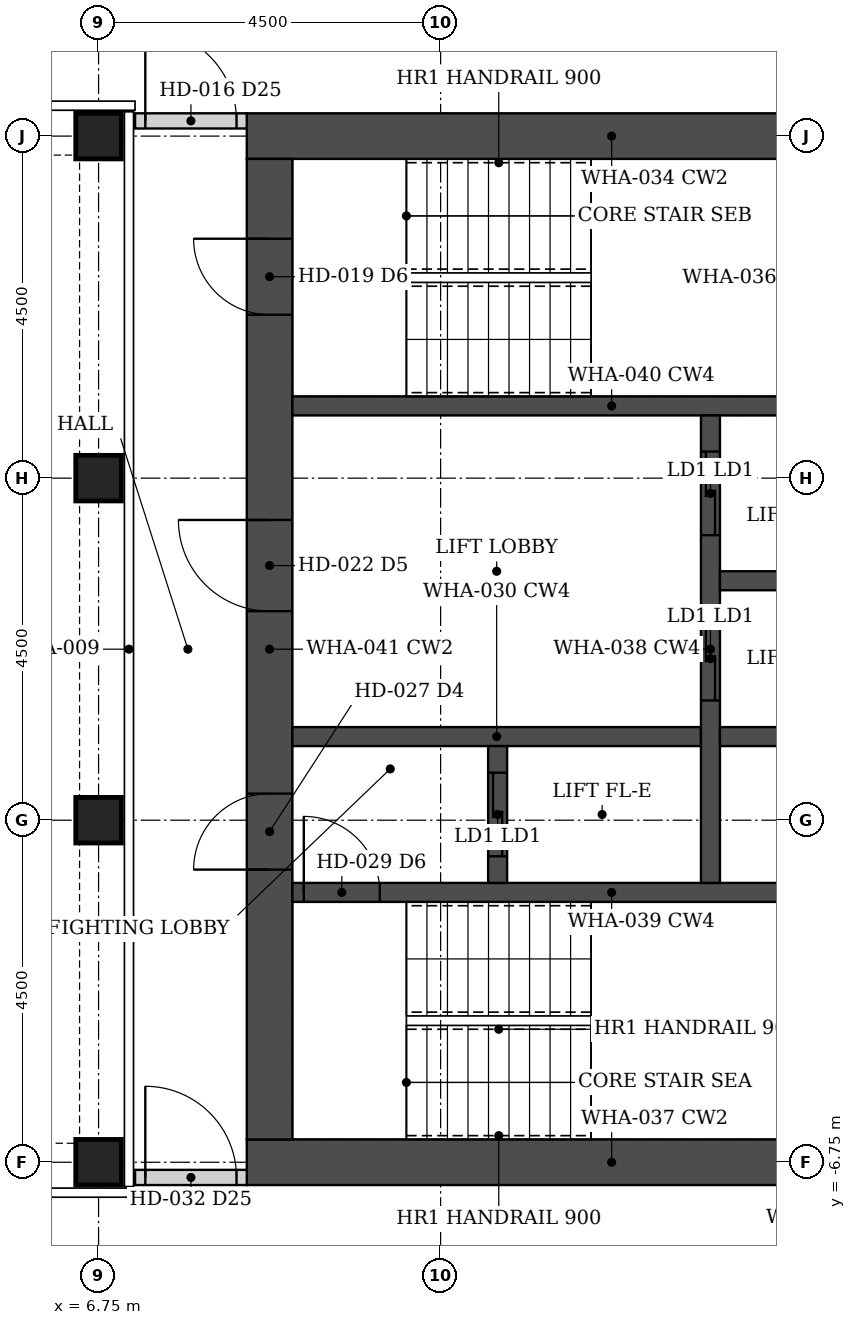
"""IFC4 building model, lengths in metres.
Left out: names, types, materials, properties, quantities, classifications, styles, units other than length and angle.
Written with IfcOpenShell. Run it as: python <this file> out.ifc"""

import sys

from ifc_helpers import new_model, si_unit, direction, frame, frame_2d, origin, origin_2d, place, context, subcontext, project, spatial, rectangle, hollow_rectangle, extrude, element, fill, save


model = new_model("IFC4")
c1 = context("Model", 3, precision=1e-05, world=origin(), true_north=direction((0.0, 1.0)))
c2 = subcontext(c1, "Body", "Model", "MODEL_VIEW")
j1 = project(units=[si_unit("LENGTHUNIT", "METRE"), si_unit("PLANEANGLEUNIT", "RADIAN")], contexts=[c1])
p1 = place(None, origin())
s1 = spatial("IfcSite", under=j1, at=p1, CompositionType="ELEMENT")
p2 = place(p1, origin())
s2 = spatial("IfcBuilding", under=s1, at=p2, CompositionType="ELEMENT")
p3 = place(p2, frame((0.0, 0.0, 150.8)))
s3 = spatial("IfcBuildingStorey", under=s2, at=p3, CompositionType="ELEMENT", Elevation=150.8)
for number, where, z_axis, x_axis in (
    (1, (6.75, -6.75, 0.0), (0.0, 0.0, 1.0), (1.0, 0.0, 0.0)),
    (2, (6.75, -2.25, 0.0), (0.0, 0.0, 1.0), (1.0, 0.0, 0.0)),
    (3, (6.75, 2.25, 0.0), (0.0, 0.0, 1.0), (1.0, 0.0, 0.0)),
    (4, (6.75, 6.75, 0.0), (0.0, 0.0, 1.0), (1.0, 0.0, 0.0)),
):
    element("IfcColumn", number, at=place(p3, frame(where, z_axis=z_axis, x_axis=x_axis)), inside=s3, PredefinedType="COLUMN", context=c2, shape_type="SweptSolid", body=[
        extrude(hollow_rectangle(XDim=0.6, YDim=0.6, WallThickness=0.04, at=origin_2d()), origin(), (0.0, 0.0, 1.0), 3.6),
    ])
for number, where, z_axis, x_axis in (
    (5, (8.7, -6.75, 0.0), (0.0, 0.0, 1.0), (1.0, 0.0, 0.0)),
    (6, (8.7, 6.75, 0.0), (0.0, 0.0, 1.0), (1.0, 0.0, 0.0)),
):
    element("IfcWall", number, at=place(p3, frame(where, z_axis=z_axis, x_axis=x_axis)), inside=s3, PredefinedType="SHEAR", context=c2, shape_type="SweptSolid", body=[
        extrude(rectangle(XDim=9.6, YDim=0.6, at=frame_2d((4.8, 0.0))), origin(), (0.0, 0.0, 1.0), 3.6),
    ])
p4 = place(p3, frame((9.0, -6.45, 0.0), z_axis=(0.0, 0.0, 1.0), x_axis=(0.0, 1.0, 0.0)))
e7 = element("IfcWall", 7, at=p4, inside=s3, PredefinedType="SHEAR", context=c2, shape_type="SweptSolid", body=[
    extrude(rectangle(XDim=12.9, YDim=0.6, at=frame_2d((6.45, 0.0))), origin(), (0.0, 0.0, 1.0), 3.6),
])
p5 = place(p4, frame((3.55, 0.0, 0.0)))
e8 = element("IfcOpeningElement", 8, at=p5, cuts=e7, PredefinedType="OPENING", context=c2, shape_type="SweptSolid", body=[
    extrude(rectangle(XDim=1.0, YDim=2.1, at=frame_2d((0.5, 1.05))), frame((0.0, 0.31, 0.0), z_axis=(0.0, -1.0, 0.0), x_axis=(1.0, 0.0, 0.0)), (0.0, 0.0, 1.0), 0.62),
])
p6 = place(p4, frame((6.95, 0.0, 0.0)))
e9 = element("IfcOpeningElement", 9, at=p6, cuts=e7, PredefinedType="OPENING", context=c2, shape_type="SweptSolid", body=[
    extrude(rectangle(XDim=1.2, YDim=2.1, at=frame_2d((0.6, 1.05))), frame((0.0, 0.31, 0.0), z_axis=(0.0, -1.0, 0.0), x_axis=(1.0, 0.0, 0.0)), (0.0, 0.0, 1.0), 0.62),
])
p7 = place(p4, frame((10.85, 0.0, 0.0)))
e10 = element("IfcOpeningElement", 10, at=p7, cuts=e7, PredefinedType="OPENING", context=c2, shape_type="SweptSolid", body=[
    extrude(rectangle(XDim=1.0, YDim=2.1, at=frame_2d((0.5, 1.05))), frame((0.0, 0.31, 0.0), z_axis=(0.0, -1.0, 0.0), x_axis=(1.0, 0.0, 0.0)), (0.0, 0.0, 1.0), 0.62),
])
p8 = place(p3, frame((9.3, -3.2, 0.0), z_axis=(0.0, 0.0, 1.0), x_axis=(1.0, 0.0, 0.0)))
e11 = element("IfcWall", 11, at=p8, inside=s3, PredefinedType="SHEAR", context=c2, shape_type="SweptSolid", body=[
    extrude(rectangle(XDim=8.4, YDim=0.25, at=frame_2d((4.2, 0.0))), origin(), (0.0, 0.0, 1.0), 3.6),
])
p9 = place(p8, frame((0.15, 0.0, 0.0)))
e12 = element("IfcOpeningElement", 12, at=p9, cuts=e11, PredefinedType="OPENING", context=c2, shape_type="SweptSolid", body=[
    extrude(rectangle(XDim=1.0, YDim=2.1, at=frame_2d((0.5, 1.05))), frame((0.0, 0.135, 0.0), z_axis=(0.0, -1.0, 0.0), x_axis=(1.0, 0.0, 0.0)), (0.0, 0.0, 1.0), 0.27),
])
p10 = place(p3, frame((9.3, 3.2, 0.0), z_axis=(0.0, 0.0, 1.0), x_axis=(1.0, 0.0, 0.0)))
e13 = element("IfcWall", 13, at=p10, inside=s3, PredefinedType="SHEAR", context=c2, shape_type="SweptSolid", body=[
    extrude(rectangle(XDim=8.4, YDim=0.25, at=frame_2d((4.2, 0.0))), origin(), (0.0, 0.0, 1.0), 3.6),
])
p11 = place(p3, frame((9.3, -1.15, 0.0), z_axis=(0.0, 0.0, 1.0), x_axis=(1.0, 0.0, 0.0)))
e14 = element("IfcWall", 14, at=p11, inside=s3, PredefinedType="SHEAR", context=c2, shape_type="SweptSolid", body=[
    extrude(rectangle(XDim=5.375, YDim=0.25, at=frame_2d((2.688, 0.0))), origin(), (0.0, 0.0, 1.0), 3.6),
])
p12 = place(p3, frame((12.0, -3.075, 0.0), z_axis=(0.0, 0.0, 1.0), x_axis=(0.0, 1.0, 0.0)))
e15 = element("IfcWall", 15, at=p12, inside=s3, PredefinedType="SHEAR", context=c2, shape_type="SweptSolid", body=[
    extrude(rectangle(XDim=1.8, YDim=0.25, at=frame_2d((0.9, 0.0))), origin(), (0.0, 0.0, 1.0), 3.6),
])
p13 = place(p12, frame((0.35, 0.0, 0.0)))
e16 = element("IfcOpeningElement", 16, at=p13, cuts=e15, PredefinedType="OPENING", context=c2, shape_type="SweptSolid", body=[
    extrude(rectangle(XDim=1.1, YDim=2.1, at=frame_2d((0.55, 1.05))), frame((0.0, 0.135, 0.0), z_axis=(0.0, -1.0, 0.0), x_axis=(1.0, 0.0, 0.0)), (0.0, 0.0, 1.0), 0.27),
])
p14 = place(p3, frame((14.8, -3.075, 0.0), z_axis=(0.0, 0.0, 1.0), x_axis=(0.0, 1.0, 0.0)))
e17 = element("IfcWall", 17, at=p14, inside=s3, PredefinedType="SHEAR", context=c2, shape_type="SweptSolid", body=[
    extrude(rectangle(XDim=6.15, YDim=0.25, at=frame_2d((3.075, 0.0))), origin(), (0.0, 0.0, 1.0), 3.6),
])
p15 = place(p14, frame((2.4, 0.0, 0.0)))
e18 = element("IfcOpeningElement", 18, at=p15, cuts=e17, PredefinedType="OPENING", context=c2, shape_type="SweptSolid", body=[
    extrude(rectangle(XDim=1.1, YDim=2.1, at=frame_2d((0.55, 1.05))), frame((0.0, 0.135, 0.0), z_axis=(0.0, -1.0, 0.0), x_axis=(1.0, 0.0, 0.0)), (0.0, 0.0, 1.0), 0.27),
])
p16 = place(p14, frame((4.575, 0.0, 0.0)))
e19 = element("IfcOpeningElement", 19, at=p16, cuts=e17, PredefinedType="OPENING", context=c2, shape_type="SweptSolid", body=[
    extrude(rectangle(XDim=1.1, YDim=2.1, at=frame_2d((0.55, 1.05))), frame((0.0, 0.135, 0.0), z_axis=(0.0, -1.0, 0.0), x_axis=(1.0, 0.0, 0.0)), (0.0, 0.0, 1.0), 0.27),
])
for number, where, z_axis, x_axis in (
    (20, (14.925, -1.15, 0.0), (0.0, 0.0, 1.0), (1.0, 0.0, 0.0)),
    (21, (14.925, 0.9, 0.0), (0.0, 0.0, 1.0), (1.0, 0.0, 0.0)),
):
    element("IfcWall", number, at=place(p3, frame(where, z_axis=z_axis, x_axis=x_axis)), inside=s3, PredefinedType="SHEAR", context=c2, shape_type="SweptSolid", body=[
        extrude(rectangle(XDim=2.775, YDim=0.25, at=frame_2d((1.387, 0.0))), origin(), (0.0, 0.0, 1.0), 3.6),
    ])
p17 = place(p3, frame((7.23, 6.95, 0.0), z_axis=(0.0, 0.0, 1.0), x_axis=(1.0, 0.0, 0.0)))
e22 = element("IfcWall", 22, at=p17, inside=s3, PredefinedType="PARTITIONING", context=c2, shape_type="SweptSolid", body=[
    extrude(rectangle(XDim=1.47, YDim=0.2, at=frame_2d((0.735, 0.0))), origin(), (0.0, 0.0, 1.0), 2.473),
])
p18 = place(p17, frame((0.135, 0.0, 0.0)))
e23 = element("IfcOpeningElement", 23, at=p18, cuts=e22, PredefinedType="OPENING", context=c2, shape_type="SweptSolid", body=[
    extrude(rectangle(XDim=1.2, YDim=2.1, at=frame_2d((0.6, 1.05))), frame((0.0, 0.11, 0.0), z_axis=(0.0, -1.0, 0.0), x_axis=(1.0, 0.0, 0.0)), (0.0, 0.0, 1.0), 0.22),
])
p19 = place(p3, frame((7.23, -6.95, 0.0), z_axis=(0.0, 0.0, 1.0), x_axis=(1.0, 0.0, 0.0)))
e24 = element("IfcWall", 24, at=p19, inside=s3, PredefinedType="PARTITIONING", context=c2, shape_type="SweptSolid", body=[
    extrude(rectangle(XDim=1.47, YDim=0.2, at=frame_2d((0.735, 0.0))), origin(), (0.0, 0.0, 1.0), 2.473),
])
p20 = place(p19, frame((0.135, 0.0, 0.0)))
e25 = element("IfcOpeningElement", 25, at=p20, cuts=e24, PredefinedType="OPENING", context=c2, shape_type="SweptSolid", body=[
    extrude(rectangle(XDim=1.2, YDim=2.1, at=frame_2d((0.6, 1.05))), frame((0.0, 0.11, 0.0), z_axis=(0.0, -1.0, 0.0), x_axis=(1.0, 0.0, 0.0)), (0.0, 0.0, 1.0), 0.22),
])
p21 = place(p18, origin())
e26 = element("IfcDoor", 26, at=p21, inside=s3, OperationType="DOUBLE_DOOR_DOUBLE_SWING", PredefinedType="DOOR", context=c2, shape_type="SweptSolid", body=[
    extrude(rectangle(XDim=1.2, YDim=2.1, at=frame_2d((0.6, 1.05))), frame((0.0, 0.025, 0.0), z_axis=(0.0, -1.0, 0.0), x_axis=(1.0, 0.0, 0.0)), (0.0, 0.0, 1.0), 0.05),
])
fill(e23, e26)
p22 = place(p20, origin())
e27 = element("IfcDoor", 27, at=p22, inside=s3, OperationType="DOUBLE_DOOR_DOUBLE_SWING", PredefinedType="DOOR", context=c2, shape_type="SweptSolid", body=[
    extrude(rectangle(XDim=1.2, YDim=2.1, at=frame_2d((0.6, 1.05))), frame((0.0, 0.025, 0.0), z_axis=(0.0, -1.0, 0.0), x_axis=(1.0, 0.0, 0.0)), (0.0, 0.0, 1.0), 0.05),
])
fill(e25, e27)
p23 = place(p5, origin())
e28 = element("IfcDoor", 28, at=p23, inside=s3, OperationType="SINGLE_SWING_LEFT", PredefinedType="DOOR", context=c2, shape_type="SweptSolid", body=[
    extrude(rectangle(XDim=1.0, YDim=2.1, at=frame_2d((0.5, 1.05))), frame((0.0, 0.025, 0.0), z_axis=(0.0, -1.0, 0.0), x_axis=(1.0, 0.0, 0.0)), (0.0, 0.0, 1.0), 0.05),
])
fill(e8, e28)
p24 = place(p9, origin())
e29 = element("IfcDoor", 29, at=p24, inside=s3, OperationType="SINGLE_SWING_LEFT", PredefinedType="DOOR", context=c2, shape_type="SweptSolid", body=[
    extrude(rectangle(XDim=1.0, YDim=2.1, at=frame_2d((0.5, 1.05))), frame((0.0, 0.025, 0.0), z_axis=(0.0, -1.0, 0.0), x_axis=(1.0, 0.0, 0.0)), (0.0, 0.0, 1.0), 0.05),
])
fill(e12, e29)
p25 = place(p6, origin())
e30 = element("IfcDoor", 30, at=p25, inside=s3, OperationType="SINGLE_SWING_RIGHT", PredefinedType="DOOR", context=c2, shape_type="SweptSolid", body=[
    extrude(rectangle(XDim=1.2, YDim=2.1, at=frame_2d((0.6, 1.05))), frame((0.0, 0.025, 0.0), z_axis=(0.0, -1.0, 0.0), x_axis=(1.0, 0.0, 0.0)), (0.0, 0.0, 1.0), 0.05),
])
fill(e9, e30)
p26 = place(p7, origin())
e31 = element("IfcDoor", 31, at=p26, inside=s3, OperationType="SINGLE_SWING_RIGHT", PredefinedType="DOOR", context=c2, shape_type="SweptSolid", body=[
    extrude(rectangle(XDim=1.0, YDim=2.1, at=frame_2d((0.5, 1.05))), frame((0.0, 0.025, 0.0), z_axis=(0.0, -1.0, 0.0), x_axis=(1.0, 0.0, 0.0)), (0.0, 0.0, 1.0), 0.05),
])
fill(e10, e31)
p27 = place(p13, origin())
e32 = element("IfcDoor", 32, at=p27, inside=s3, OperationType="DOUBLE_DOOR_SLIDING", PredefinedType="DOOR", context=c2, shape_type="SweptSolid", body=[
    extrude(rectangle(XDim=1.1, YDim=2.1, at=frame_2d((0.55, 1.05))), frame((0.0, 0.025, 0.0), z_axis=(0.0, -1.0, 0.0), x_axis=(1.0, 0.0, 0.0)), (0.0, 0.0, 1.0), 0.05),
])
fill(e16, e32)
p28 = place(p15, origin())
e33 = element("IfcDoor", 33, at=p28, inside=s3, OperationType="DOUBLE_DOOR_SLIDING", PredefinedType="DOOR", context=c2, shape_type="SweptSolid", body=[
    extrude(rectangle(XDim=1.1, YDim=2.1, at=frame_2d((0.55, 1.05))), frame((0.0, 0.025, 0.0), z_axis=(0.0, -1.0, 0.0), x_axis=(1.0, 0.0, 0.0)), (0.0, 0.0, 1.0), 0.05),
])
fill(e18, e33)
p29 = place(p16, origin())
e34 = element("IfcDoor", 34, at=p29, inside=s3, OperationType="DOUBLE_DOOR_SLIDING", PredefinedType="DOOR", context=c2, shape_type="SweptSolid", body=[
    extrude(rectangle(XDim=1.1, YDim=2.1, at=frame_2d((0.55, 1.05))), frame((0.0, 0.025, 0.0), z_axis=(0.0, -1.0, 0.0), x_axis=(1.0, 0.0, 0.0)), (0.0, 0.0, 1.0), 0.05),
])
fill(e19, e34)
save(model, sys.argv[1])
